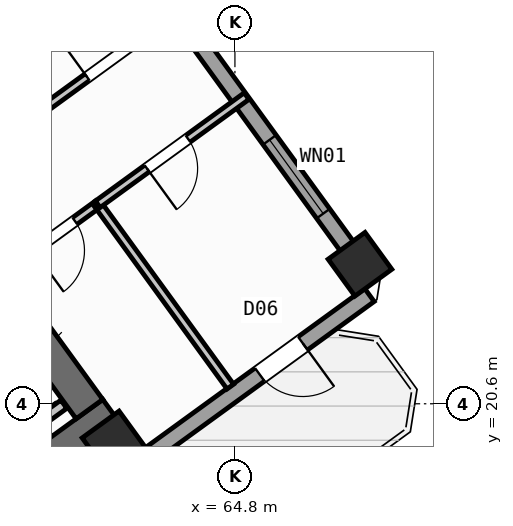
"""IFC4 building model, lengths in metres.
Left out: names, types, materials, properties, quantities, classifications, styles, units other than length and angle.
Written with IfcOpenShell. Run it as: python <this file> out.ifc"""

import sys

from ifc_helpers import new_model, si_unit, direction, frame, frame_2d, origin, origin_2d, place, context, subcontext, project, spatial, rectangle, hollow_rectangle, extrude, source, transform, mapped, element, fill, save


model = new_model("IFC4")
c1 = context("Model", 3, precision=1e-05, world=origin(), true_north=direction((0.0, 1.0)))
c2 = subcontext(c1, "Body", "Model", "MODEL_VIEW")
j1 = project(units=[si_unit("LENGTHUNIT", "METRE"), si_unit("PLANEANGLEUNIT", "RADIAN")], contexts=[c1])
p1 = place(None, origin())
s1 = spatial("IfcSite", under=j1, at=p1, CompositionType="ELEMENT")
p2 = place(p1, origin())
s2 = spatial("IfcBuilding", under=s1, at=p2, CompositionType="ELEMENT")
p3 = place(p2, frame((0.0, 0.0, 90.0)))
s3 = spatial("IfcBuildingStorey", under=s2, at=p3, CompositionType="ELEMENT", Elevation=90.0)
p4 = place(p3, frame((52.318, 13.11, 0.0), z_axis=(0.0, 0.0, 1.0), x_axis=(0.809019445368, 0.587781878776, 0.0)))
e1 = element("IfcWall", 1, at=p4, inside=s3, PredefinedType="SHEAR", context=c2, shape_type="SweptSolid", body=[
    extrude(rectangle(XDim=12.44, YDim=0.65, at=frame_2d((6.22, 0.0))), origin(), (0.0, 0.0, 1.0), 3.35),
])
p5 = place(p3, frame((61.929, 20.494, 0.0), z_axis=(0.0, 0.0, 1.0), x_axis=(-0.58782982593, 0.808984607855, 0.0)))
e2 = element("IfcWall", 2, at=p5, inside=s3, PredefinedType="SHEAR", context=c2, shape_type="SweptSolid", body=[
    extrude(rectangle(XDim=3.525, YDim=0.65, at=frame_2d((1.762, 0.0))), origin(), (0.0, 0.0, 1.0), 3.35),
])
m1 = source(origin(), c2, "Body", "SweptSolid", [
    extrude(hollow_rectangle(XDim=0.9, YDim=0.9, WallThickness=0.036, at=origin_2d()), origin(), (0.0, 0.0, 1.0), 3.6),
])
for number, where, z_axis, x_axis in (
    (3, (62.414, 19.827, 0.0), (0.0, 0.0, 1.0), (0.809, 0.588, 0.0)),
    (4, (67.268, 23.354, 0.0), (0.0, 0.0, 1.0), (0.809, 0.588, 0.0)),
):
    element("IfcColumn", number, at=place(p3, frame(where, z_axis=z_axis, x_axis=x_axis)), inside=s3, PredefinedType="COLUMN", context=c2, shape_type="MappedRepresentation", body=[
        mapped(m1, transform((0.0, 0.0, 0.0), scale=1.0)),
    ])
p6 = place(p3, frame((54.81, 40.5, 0.0), z_axis=(0.0, 0.0, 1.0), x_axis=(0.587783625747, -0.809018176127, 0.0)))
e5 = element("IfcWall", 5, at=p6, inside=s3, PredefinedType="STANDARD", context=c2, shape_type="SweptSolid", body=[
    extrude(rectangle(XDim=21.587, YDim=0.32, at=frame_2d((10.794, 0.0))), origin(), (0.0, 0.0, 1.0), 2.775),
])
p7 = place(p6, frame((9.194, 0.0, 0.8)))
e6 = element("IfcOpeningElement", 6, at=p7, cuts=e5, PredefinedType="OPENING", context=c2, shape_type="SweptSolid", body=[
    extrude(rectangle(XDim=2.1, YDim=1.55, at=frame_2d((1.05, 0.775))), frame((0.0, 0.17, 0.0), z_axis=(0.0, -1.0, 0.0), x_axis=(1.0, 0.0, 0.0)), (0.0, 0.0, 1.0), 0.34),
])
p8 = place(p6, frame((18.159, 0.0, 0.85)))
e7 = element("IfcOpeningElement", 7, at=p8, cuts=e5, PredefinedType="OPENING", context=c2, shape_type="SweptSolid", body=[
    extrude(rectangle(XDim=1.8, YDim=1.5, at=frame_2d((0.9, 0.75))), frame((0.0, 0.17, 0.0), z_axis=(0.0, -1.0, 0.0), x_axis=(1.0, 0.0, 0.0)), (0.0, 0.0, 1.0), 0.34),
])
p9 = place(p3, frame((67.454, 22.747, 0.0), z_axis=(0.0, 0.0, 1.0), x_axis=(-0.809021120468, -0.587779573171, 0.0)))
e8 = element("IfcWall", 8, at=p9, inside=s3, PredefinedType="STANDARD", context=c2, shape_type="SweptSolid", body=[
    extrude(rectangle(XDim=17.588, YDim=0.32, at=frame_2d((8.794, 0.0))), origin(), (0.0, 0.0, 1.0), 3.35),
])
p10 = place(p9, frame((1.624, 0.0, 0.0)))
e9 = element("IfcOpeningElement", 9, at=p10, cuts=e8, PredefinedType="OPENING", context=c2, shape_type="SweptSolid", body=[
    extrude(rectangle(XDim=1.05, YDim=2.15, at=frame_2d((0.525, 1.075))), frame((0.0, 0.17, 0.0), z_axis=(0.0, -1.0, 0.0), x_axis=(1.0, 0.0, 0.0)), (0.0, 0.0, 1.0), 0.34),
])
p11 = place(p9, frame((8.144, 0.0, 0.8)))
e10 = element("IfcOpeningElement", 10, at=p11, cuts=e8, PredefinedType="OPENING", context=c2, shape_type="SweptSolid", body=[
    extrude(rectangle(XDim=2.1, YDim=1.55, at=frame_2d((1.05, 0.775))), frame((0.0, 0.17, 0.0), z_axis=(0.0, -1.0, 0.0), x_axis=(1.0, 0.0, 0.0)), (0.0, 0.0, 1.0), 0.34),
])
p12 = place(p9, frame((13.344, 0.0, 0.8)))
e11 = element("IfcOpeningElement", 11, at=p12, cuts=e8, PredefinedType="OPENING", context=c2, shape_type="SweptSolid", body=[
    extrude(rectangle(XDim=2.1, YDim=1.55, at=frame_2d((1.05, 0.775))), frame((0.0, 0.17, 0.0), z_axis=(0.0, -1.0, 0.0), x_axis=(1.0, 0.0, 0.0)), (0.0, 0.0, 1.0), 0.34),
])
p13 = place(p3, frame((58.472, 18.447, 0.0), z_axis=(0.0, 0.0, 1.0), x_axis=(0.809022487728, 0.587777691266, 0.0)))
e12 = element("IfcWall", 12, at=p13, inside=s3, PredefinedType="STANDARD", context=c2, shape_type="SweptSolid", body=[
    extrude(rectangle(XDim=3.648, YDim=0.2, at=frame_2d((1.824, 0.0))), origin(), (0.0, 0.0, 1.0), 3.34),
])
p14 = place(p3, frame((60.347, 23.27, 0.0), z_axis=(0.0, 0.0, 1.0), x_axis=(0.80899039758, 0.587821857898, 0.0)))
e13 = element("IfcWall", 13, at=p14, inside=s3, PredefinedType="PARTITIONING", context=c2, shape_type="SweptSolid", body=[
    extrude(rectangle(XDim=2.158, YDim=0.16, at=frame_2d((1.079, 0.0))), origin(), (0.0, 0.0, 1.0), 3.34),
])
p15 = place(p14, frame((0.598, 0.0, 0.0)))
e14 = element("IfcOpeningElement", 14, at=p15, cuts=e13, PredefinedType="OPENING", context=c2, shape_type="SweptSolid", body=[
    extrude(rectangle(XDim=1.0, YDim=2.1, at=frame_2d((0.5, 1.05))), frame((0.0, 0.09, 0.0), z_axis=(0.0, -1.0, 0.0), x_axis=(1.0, 0.0, 0.0)), (0.0, 0.0, 1.0), 0.18),
])
p16 = place(p3, frame((64.709, 20.938, 0.0), z_axis=(0.0, 0.0, 1.0), x_axis=(-0.587773666605, 0.809025411743, 0.0)))
e15 = element("IfcWall", 15, at=p16, inside=s3, PredefinedType="PARTITIONING", context=c2, shape_type="SweptSolid", body=[
    extrude(rectangle(XDim=4.45, YDim=0.16, at=frame_2d((2.225, 0.0))), origin(), (0.0, 0.0, 1.0), 3.34),
])
p17 = place(p3, frame((62.093, 24.538, 0.0), z_axis=(0.0, 0.0, 1.0), x_axis=(0.809035546126, 0.58775971715, 0.0)))
e16 = element("IfcWall", 16, at=p17, inside=s3, PredefinedType="PARTITIONING", context=c2, shape_type="SweptSolid", body=[
    extrude(rectangle(XDim=3.63, YDim=0.16, at=frame_2d((1.815, 0.0))), origin(), (0.0, 0.0, 1.0), 3.34),
])
p18 = place(p17, frame((1.2, 0.0, 0.0)))
e17 = element("IfcOpeningElement", 17, at=p18, cuts=e16, PredefinedType="OPENING", context=c2, shape_type="SweptSolid", body=[
    extrude(rectangle(XDim=1.0, YDim=2.1, at=frame_2d((0.5, 1.05))), frame((0.0, 0.09, 0.0), z_axis=(0.0, -1.0, 0.0), x_axis=(1.0, 0.0, 0.0)), (0.0, 0.0, 1.0), 0.18),
])
p19 = place(p3, frame((60.829, 26.278, 0.0), z_axis=(0.0, 0.0, 1.0), x_axis=(0.809003564202, 0.587803736896, 0.0)))
e18 = element("IfcWall", 18, at=p19, inside=s3, PredefinedType="PARTITIONING", context=c2, shape_type="SweptSolid", body=[
    extrude(rectangle(XDim=3.63, YDim=0.16, at=frame_2d((1.815, 0.0))), origin(), (0.0, 0.0, 1.0), 3.34),
])
p20 = place(p19, frame((1.305, 0.0, 0.0)))
e19 = element("IfcOpeningElement", 19, at=p20, cuts=e18, PredefinedType="OPENING", context=c2, shape_type="SweptSolid", body=[
    extrude(rectangle(XDim=1.0, YDim=2.1, at=frame_2d((0.5, 1.05))), frame((0.0, 0.09, 0.0), z_axis=(0.0, -1.0, 0.0), x_axis=(1.0, 0.0, 0.0)), (0.0, 0.0, 1.0), 0.18),
])
m2 = source(origin(), c2, "Body", "SweptSolid", [
    extrude(rectangle(XDim=1.05, YDim=2.15, at=frame_2d((0.525, 1.075))), frame((0.0, 0.025, 0.0), z_axis=(0.0, -1.0, 0.0), x_axis=(1.0, 0.0, 0.0)), (0.0, 0.0, 1.0), 0.05),
])
p21 = place(p10, origin())
e20 = element("IfcDoor", 20, at=p21, inside=s3, OperationType="SINGLE_SWING_LEFT", PredefinedType="DOOR", context=c2, shape_type="MappedRepresentation", body=[
    mapped(m2, transform((0.0, 0.0, 0.0), scale=1.0)),
])
fill(e9, e20)
m3 = source(origin(), c2, "Body", "SweptSolid", [
    extrude(rectangle(XDim=1.8, YDim=1.5, at=frame_2d((0.9, 0.75))), frame((0.0, 0.03, 0.0), z_axis=(0.0, -1.0, 0.0), x_axis=(1.0, 0.0, 0.0)), (0.0, 0.0, 1.0), 0.06),
])
p22 = place(p8, origin())
e21 = element("IfcWindow", 21, at=p22, inside=s3, PartitioningType="SINGLE_PANEL", PredefinedType="WINDOW", context=c2, shape_type="MappedRepresentation", body=[
    mapped(m3, transform((0.0, 0.0, 0.0), scale=1.0)),
])
fill(e7, e21)
m4 = source(origin(), c2, "Body", "SweptSolid", [
    extrude(rectangle(XDim=1.0, YDim=2.1, at=frame_2d((0.5, 1.05))), frame((0.0, 0.025, 0.0), z_axis=(0.0, -1.0, 0.0), x_axis=(1.0, 0.0, 0.0)), (0.0, 0.0, 1.0), 0.05),
])
p23 = place(p15, frame((1.0, 0.0, 0.0), z_axis=(0.0, 0.0, 1.0), x_axis=(-1.0, 0.0, 0.0)))
e22 = element("IfcDoor", 22, at=p23, inside=s3, OperationType="SINGLE_SWING_RIGHT", PredefinedType="DOOR", context=c2, shape_type="MappedRepresentation", body=[
    mapped(m4, transform((0.0, 0.0, 0.0), scale=1.0)),
])
fill(e14, e22)
p24 = place(p20, origin())
e23 = element("IfcDoor", 23, at=p24, inside=s3, OperationType="SINGLE_SWING_LEFT", PredefinedType="DOOR", context=c2, shape_type="MappedRepresentation", body=[
    mapped(m4, transform((0.0, 0.0, 0.0), scale=1.0)),
])
fill(e19, e23)
p25 = place(p18, frame((1.0, 0.0, 0.0), z_axis=(0.0, 0.0, 1.0), x_axis=(-1.0, 0.0, 0.0)))
e24 = element("IfcDoor", 24, at=p25, inside=s3, OperationType="SINGLE_SWING_RIGHT", PredefinedType="DOOR", context=c2, shape_type="MappedRepresentation", body=[
    mapped(m4, transform((0.0, 0.0, 0.0), scale=1.0)),
])
fill(e17, e24)
save(model, sys.argv[1])
